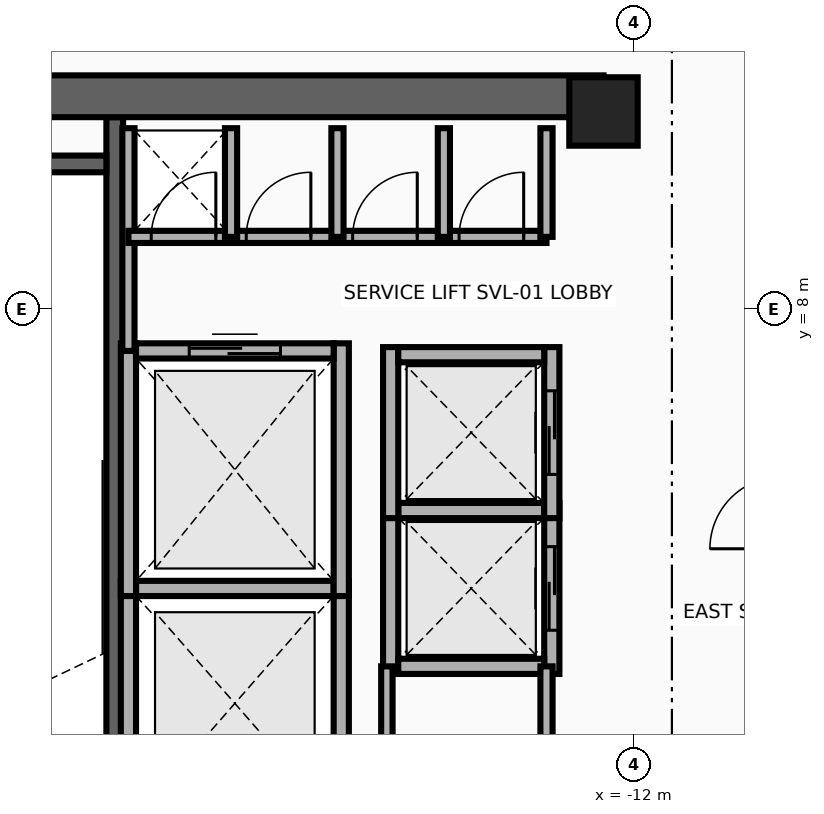
"""IFC4 building model, lengths in metres.
Left out: names, types, materials, properties, quantities, classifications, styles, units other than length and angle.
Written with IfcOpenShell. Run it as: python <this file> out.ifc"""

import sys

from ifc_helpers import new_model, si_unit, direction, frame, frame_2d, origin, origin_2d, place, context, subcontext, project, spatial, rectangle, extrude, source, transform, mapped, element, fill, save


model = new_model("IFC4")
c1 = context("Model", 3, precision=1e-05, world=origin(), true_north=direction((0.0, 1.0)))
c2 = subcontext(c1, "Body", "Model", "MODEL_VIEW")
j1 = project(units=[si_unit("LENGTHUNIT", "METRE"), si_unit("PLANEANGLEUNIT", "RADIAN")], contexts=[c1])
p1 = place(None, origin())
s1 = spatial("IfcSite", under=j1, at=p1, CompositionType="ELEMENT")
p2 = place(p1, origin())
s2 = spatial("IfcBuilding", under=s1, at=p2, CompositionType="ELEMENT")
p3 = place(p2, frame((0.0, 0.0, 230.0)))
s3 = spatial("IfcBuildingStorey", under=s2, at=p3, CompositionType="ELEMENT", Elevation=230.0)
p4 = place(p3, frame((-18.83, 1.78, 0.0), z_axis=(0.0, 0.0, 1.0), x_axis=(0.0, 1.0, 0.0)))
e1 = element("IfcWall", 1, at=p4, inside=s3, PredefinedType="SHEAR", context=c2, shape_type="SweptSolid", body=[
    extrude(rectangle(XDim=8.745, YDim=0.22, at=frame_2d((4.373, 0.0))), origin(), (0.0, 0.0, 1.0), 3.26),
])
p5 = place(p3, frame((-22.05, 9.91, 0.0), z_axis=(0.0, 0.0, 1.0), x_axis=(1.0, 0.0, 0.0)))
e2 = element("IfcWall", 2, at=p5, inside=s3, PredefinedType="SHEAR", context=c2, shape_type="SweptSolid", body=[
    extrude(rectangle(XDim=3.11, YDim=0.22, at=frame_2d((1.555, 0.0))), origin(), (0.0, 0.0, 1.0), 3.26),
])
p6 = place(p3, frame((-22.65, 10.8, 0.0), z_axis=(0.0, 0.0, 1.0), x_axis=(1.0, 0.0, 0.0)))
e3 = element("IfcWall", 3, at=p6, inside=s3, PredefinedType="SHEAR", context=c2, shape_type="SweptSolid", body=[
    extrude(rectangle(XDim=10.25, YDim=0.55, at=frame_2d((5.125, 0.0))), origin(), (0.0, 0.0, 1.0), 3.26),
])
m1 = source(origin(), c2, "Body", "SweptSolid", [
    extrude(rectangle(XDim=0.9, YDim=0.9, at=origin_2d()), origin(), (0.0, 0.0, 1.0), 3.5),
])
p7 = place(p3, frame((-12.4, 10.6, 0.0), z_axis=(0.0, 0.0, 1.0), x_axis=(1.0, 0.0, 0.0)))
e4 = element("IfcColumn", 4, at=p7, inside=s3, PredefinedType="COLUMN", context=c2, shape_type="MappedRepresentation", body=[
    mapped(m1, transform((0.0, 0.0, 0.0), x_axis=(1.0, 0.0, 0.0), y_axis=(0.0, 1.0, 0.0), z_axis=(0.0, 0.0, 1.0), scale=1.0)),
])
for number, where, z_axis, x_axis in (
    (5, (-18.65, 1.2, 0.0), (0.0, 0.0, 1.0), (0.0, 1.0, 0.0)),
    (6, (-15.85, 1.2, 0.0), (0.0, 0.0, 1.0), (0.0, 1.0, 0.0)),
):
    element("IfcWall", number, at=place(p3, frame(where, z_axis=z_axis, x_axis=x_axis)), inside=s3, PredefinedType="MOVABLE", context=c2, shape_type="SweptSolid", body=[
        extrude(rectangle(XDim=3.225, YDim=0.2, at=frame_2d((1.613, 0.0))), origin(), (0.0, 0.0, 1.0), 3.26),
    ])
p8 = place(p3, frame((-18.55, 4.325, 0.0), z_axis=(0.0, 0.0, 1.0), x_axis=(1.0, 0.0, 0.0)))
e7 = element("IfcWall", 7, at=p8, inside=s3, PredefinedType="MOVABLE", context=c2, shape_type="SweptSolid", body=[
    extrude(rectangle(XDim=2.6, YDim=0.2, at=frame_2d((1.3, 0.0))), origin(), (0.0, 0.0, 1.0), 3.26),
])
for number, where, z_axis, x_axis in (
    (8, (-18.65, 4.225, 0.0), (0.0, 0.0, 1.0), (0.0, 1.0, 0.0)),
    (9, (-15.85, 4.225, 0.0), (0.0, 0.0, 1.0), (0.0, 1.0, 0.0)),
):
    element("IfcWall", number, at=place(p3, frame(where, z_axis=z_axis, x_axis=x_axis)), inside=s3, PredefinedType="MOVABLE", context=c2, shape_type="SweptSolid", body=[
        extrude(rectangle(XDim=3.325, YDim=0.2, at=frame_2d((1.663, 0.0))), origin(), (0.0, 0.0, 1.0), 3.26),
    ])
p9 = place(p3, frame((-18.55, 7.45, 0.0), z_axis=(0.0, 0.0, 1.0), x_axis=(1.0, 0.0, 0.0)))
e10 = element("IfcWall", 10, at=p9, inside=s3, PredefinedType="MOVABLE", context=c2, shape_type="SweptSolid", body=[
    extrude(rectangle(XDim=2.6, YDim=0.2, at=frame_2d((1.3, 0.0))), origin(), (0.0, 0.0, 1.0), 3.26),
])
p10 = place(p9, frame((0.7, 0.0, 0.0)))
e11 = element("IfcOpeningElement", 11, at=p10, cuts=e10, PredefinedType="OPENING", context=c2, shape_type="SweptSolid", body=[
    extrude(rectangle(XDim=1.2, YDim=2.1, at=frame_2d((0.6, 1.05))), frame((0.0, 0.115, 0.0), z_axis=(0.0, -1.0, 0.0), x_axis=(1.0, 0.0, 0.0)), (0.0, 0.0, 1.0), 0.23),
])
p11 = place(p3, frame((-15.2, 3.2, 0.0), z_axis=(0.0, 0.0, 1.0), x_axis=(0.0, 1.0, 0.0)))
e12 = element("IfcWall", 12, at=p11, inside=s3, PredefinedType="MOVABLE", context=c2, shape_type="SweptSolid", body=[
    extrude(rectangle(XDim=2.25, YDim=0.2, at=frame_2d((1.125, 0.0))), origin(), (0.0, 0.0, 1.0), 3.26),
])
p12 = place(p3, frame((-13.08, 3.2, 0.0), z_axis=(0.0, 0.0, 1.0), x_axis=(0.0, 1.0, 0.0)))
e13 = element("IfcWall", 13, at=p12, inside=s3, PredefinedType="MOVABLE", context=c2, shape_type="SweptSolid", body=[
    extrude(rectangle(XDim=2.25, YDim=0.2, at=frame_2d((1.125, 0.0))), origin(), (0.0, 0.0, 1.0), 3.26),
])
p13 = place(p12, frame((0.575, 0.0, 0.0)))
e14 = element("IfcOpeningElement", 14, at=p13, cuts=e13, PredefinedType="OPENING", context=c2, shape_type="SweptSolid", body=[
    extrude(rectangle(XDim=1.1, YDim=2.1, at=frame_2d((0.55, 1.05))), frame((0.0, 0.115, 0.0), z_axis=(0.0, -1.0, 0.0), x_axis=(1.0, 0.0, 0.0)), (0.0, 0.0, 1.0), 0.23),
])
for number, where, z_axis, x_axis in (
    (15, (-15.1, 3.3, 0.0), (0.0, 0.0, 1.0), (1.0, 0.0, 0.0)),
    (16, (-15.1, 5.35, 0.0), (0.0, 0.0, 1.0), (1.0, 0.0, 0.0)),
):
    element("IfcWall", number, at=place(p3, frame(where, z_axis=z_axis, x_axis=x_axis)), inside=s3, PredefinedType="MOVABLE", context=c2, shape_type="SweptSolid", body=[
        extrude(rectangle(XDim=1.92, YDim=0.2, at=frame_2d((0.96, 0.0))), origin(), (0.0, 0.0, 1.0), 3.26),
    ])
p14 = place(p3, frame((-15.2, 5.25, 0.0), z_axis=(0.0, 0.0, 1.0), x_axis=(0.0, 1.0, 0.0)))
e17 = element("IfcWall", 17, at=p14, inside=s3, PredefinedType="MOVABLE", context=c2, shape_type="SweptSolid", body=[
    extrude(rectangle(XDim=2.25, YDim=0.2, at=frame_2d((1.125, 0.0))), origin(), (0.0, 0.0, 1.0), 3.26),
])
p15 = place(p3, frame((-13.08, 5.25, 0.0), z_axis=(0.0, 0.0, 1.0), x_axis=(0.0, 1.0, 0.0)))
e18 = element("IfcWall", 18, at=p15, inside=s3, PredefinedType="MOVABLE", context=c2, shape_type="SweptSolid", body=[
    extrude(rectangle(XDim=2.25, YDim=0.2, at=frame_2d((1.125, 0.0))), origin(), (0.0, 0.0, 1.0), 3.26),
])
p16 = place(p15, frame((0.575, 0.0, 0.0)))
e19 = element("IfcOpeningElement", 19, at=p16, cuts=e18, PredefinedType="OPENING", context=c2, shape_type="SweptSolid", body=[
    extrude(rectangle(XDim=1.1, YDim=2.1, at=frame_2d((0.55, 1.05))), frame((0.0, 0.115, 0.0), z_axis=(0.0, -1.0, 0.0), x_axis=(1.0, 0.0, 0.0)), (0.0, 0.0, 1.0), 0.23),
])
p17 = place(p3, frame((-15.1, 7.4, 0.0), z_axis=(0.0, 0.0, 1.0), x_axis=(1.0, 0.0, 0.0)))
e20 = element("IfcWall", 20, at=p17, inside=s3, PredefinedType="MOVABLE", context=c2, shape_type="SweptSolid", body=[
    extrude(rectangle(XDim=1.92, YDim=0.2, at=frame_2d((0.96, 0.0))), origin(), (0.0, 0.0, 1.0), 3.26),
])
p18 = place(p3, frame((-18.65, 7.45, 0.0), z_axis=(0.0, 0.0, 1.0), x_axis=(0.0, 1.0, 0.0)))
e21 = element("IfcWall", 21, at=p18, inside=s3, PredefinedType="PARTITIONING", context=c2, shape_type="SweptSolid", body=[
    extrude(rectangle(XDim=2.93, YDim=0.16, at=frame_2d((1.465, 0.0))), origin(), (0.0, 0.0, 1.0), 3.26),
])
p19 = place(p3, frame((-18.65, 8.95, 0.0), z_axis=(0.0, 0.0, 1.0), x_axis=(1.0, 0.0, 0.0)))
e22 = element("IfcWall", 22, at=p19, inside=s3, PredefinedType="PARTITIONING", context=c2, shape_type="SweptSolid", body=[
    extrude(rectangle(XDim=5.5, YDim=0.16, at=frame_2d((2.75, 0.0))), origin(), (0.0, 0.0, 1.0), 3.26),
])
p20 = place(p19, frame((0.3, 0.0, 0.0)))
e23 = element("IfcOpeningElement", 23, at=p20, cuts=e22, PredefinedType="OPENING", context=c2, shape_type="SweptSolid", body=[
    extrude(rectangle(XDim=0.85, YDim=2.05, at=frame_2d((0.425, 1.025))), frame((0.0, 0.095, 0.0), z_axis=(0.0, -1.0, 0.0), x_axis=(1.0, 0.0, 0.0)), (0.0, 0.0, 1.0), 0.19),
])
p21 = place(p19, frame((1.55, 0.0, 0.0)))
e24 = element("IfcOpeningElement", 24, at=p21, cuts=e22, PredefinedType="OPENING", context=c2, shape_type="SweptSolid", body=[
    extrude(rectangle(XDim=0.85, YDim=2.05, at=frame_2d((0.425, 1.025))), frame((0.0, 0.095, 0.0), z_axis=(0.0, -1.0, 0.0), x_axis=(1.0, 0.0, 0.0)), (0.0, 0.0, 1.0), 0.19),
])
p22 = place(p19, frame((2.95, 0.0, 0.0)))
e25 = element("IfcOpeningElement", 25, at=p22, cuts=e22, PredefinedType="OPENING", context=c2, shape_type="SweptSolid", body=[
    extrude(rectangle(XDim=0.85, YDim=2.05, at=frame_2d((0.425, 1.025))), frame((0.0, 0.095, 0.0), z_axis=(0.0, -1.0, 0.0), x_axis=(1.0, 0.0, 0.0)), (0.0, 0.0, 1.0), 0.19),
])
p23 = place(p19, frame((4.35, 0.0, 0.0)))
e26 = element("IfcOpeningElement", 26, at=p23, cuts=e22, PredefinedType="OPENING", context=c2, shape_type="SweptSolid", body=[
    extrude(rectangle(XDim=0.85, YDim=2.05, at=frame_2d((0.425, 1.025))), frame((0.0, 0.095, 0.0), z_axis=(0.0, -1.0, 0.0), x_axis=(1.0, 0.0, 0.0)), (0.0, 0.0, 1.0), 0.19),
])
for number, where, z_axis, x_axis in (
    (27, (-13.15, 8.95, 0.0), (0.0, 0.0, 1.0), (0.0, 1.0, 0.0)),
    (28, (-17.3, 8.95, 0.0), (0.0, 0.0, 1.0), (0.0, 1.0, 0.0)),
    (29, (-15.9, 8.95, 0.0), (0.0, 0.0, 1.0), (0.0, 1.0, 0.0)),
    (30, (-14.5, 8.95, 0.0), (0.0, 0.0, 1.0), (0.0, 1.0, 0.0)),
):
    element("IfcWall", number, at=place(p3, frame(where, z_axis=z_axis, x_axis=x_axis)), inside=s3, PredefinedType="PARTITIONING", context=c2, shape_type="SweptSolid", body=[
        extrude(rectangle(XDim=1.43, YDim=0.16, at=frame_2d((0.715, 0.0))), origin(), (0.0, 0.0, 1.0), 3.26),
    ])
p24 = place(p3, frame((-13.15, 1.35, 0.0), z_axis=(0.0, 0.0, 1.0), x_axis=(0.0, 1.0, 0.0)))
e31 = element("IfcWall", 31, at=p24, inside=s3, PredefinedType="PARTITIONING", context=c2, shape_type="SweptSolid", body=[
    extrude(rectangle(XDim=1.95, YDim=0.16, at=frame_2d((0.975, 0.0))), origin(), (0.0, 0.0, 1.0), 3.26),
])
p25 = place(p3, frame((-15.25, 1.35, 0.0), z_axis=(0.0, 0.0, 1.0), x_axis=(0.0, 1.0, 0.0)))
e32 = element("IfcWall", 32, at=p25, inside=s3, PredefinedType="PARTITIONING", context=c2, shape_type="SweptSolid", body=[
    extrude(rectangle(XDim=1.95, YDim=0.15, at=frame_2d((0.975, 0.0))), origin(), (0.0, 0.0, 1.0), 3.26),
])
p26 = place(p10, origin())
e33 = element("IfcDoor", 33, at=p26, inside=s3, OperationType="DOUBLE_DOOR_SLIDING", PredefinedType="DOOR", context=c2, shape_type="SweptSolid", body=[
    extrude(rectangle(XDim=1.2, YDim=2.1, at=frame_2d((0.6, 1.05))), frame((0.0, 0.025, 0.0), z_axis=(0.0, -1.0, 0.0), x_axis=(1.0, 0.0, 0.0)), (0.0, 0.0, 1.0), 0.05),
])
fill(e11, e33)
p27 = place(p13, origin())
e34 = element("IfcDoor", 34, at=p27, inside=s3, OperationType="DOUBLE_DOOR_SLIDING", PredefinedType="DOOR", context=c2, shape_type="SweptSolid", body=[
    extrude(rectangle(XDim=1.1, YDim=2.1, at=frame_2d((0.55, 1.05))), frame((0.0, 0.025, 0.0), z_axis=(0.0, -1.0, 0.0), x_axis=(1.0, 0.0, 0.0)), (0.0, 0.0, 1.0), 0.05),
])
fill(e14, e34)
p28 = place(p16, origin())
e35 = element("IfcDoor", 35, at=p28, inside=s3, OperationType="DOUBLE_DOOR_SLIDING", PredefinedType="DOOR", context=c2, shape_type="SweptSolid", body=[
    extrude(rectangle(XDim=1.1, YDim=2.1, at=frame_2d((0.55, 1.05))), frame((0.0, 0.025, 0.0), z_axis=(0.0, -1.0, 0.0), x_axis=(1.0, 0.0, 0.0)), (0.0, 0.0, 1.0), 0.05),
])
fill(e19, e35)
p29 = place(p20, origin())
e36 = element("IfcDoor", 36, at=p29, inside=s3, OperationType="SINGLE_SWING_LEFT", PredefinedType="DOOR", context=c2, shape_type="SweptSolid", body=[
    extrude(rectangle(XDim=0.85, YDim=2.05, at=frame_2d((0.425, 1.025))), frame((0.0, 0.025, 0.0), z_axis=(0.0, -1.0, 0.0), x_axis=(1.0, 0.0, 0.0)), (0.0, 0.0, 1.0), 0.05),
])
fill(e23, e36)
p30 = place(p21, origin())
e37 = element("IfcDoor", 37, at=p30, inside=s3, OperationType="SINGLE_SWING_RIGHT", PredefinedType="DOOR", context=c2, shape_type="SweptSolid", body=[
    extrude(rectangle(XDim=0.85, YDim=2.05, at=frame_2d((0.425, 1.025))), frame((0.0, 0.025, 0.0), z_axis=(0.0, -1.0, 0.0), x_axis=(1.0, 0.0, 0.0)), (0.0, 0.0, 1.0), 0.05),
])
fill(e24, e37)
p31 = place(p22, origin())
e38 = element("IfcDoor", 38, at=p31, inside=s3, OperationType="SINGLE_SWING_LEFT", PredefinedType="DOOR", context=c2, shape_type="SweptSolid", body=[
    extrude(rectangle(XDim=0.85, YDim=2.05, at=frame_2d((0.425, 1.025))), frame((0.0, 0.025, 0.0), z_axis=(0.0, -1.0, 0.0), x_axis=(1.0, 0.0, 0.0)), (0.0, 0.0, 1.0), 0.05),
])
fill(e25, e38)
p32 = place(p23, origin())
e39 = element("IfcDoor", 39, at=p32, inside=s3, OperationType="SINGLE_SWING_RIGHT", PredefinedType="DOOR", context=c2, shape_type="SweptSolid", body=[
    extrude(rectangle(XDim=0.85, YDim=2.05, at=frame_2d((0.425, 1.025))), frame((0.0, 0.025, 0.0), z_axis=(0.0, -1.0, 0.0), x_axis=(1.0, 0.0, 0.0)), (0.0, 0.0, 1.0), 0.05),
])
fill(e26, e39)
save(model, sys.argv[1])
